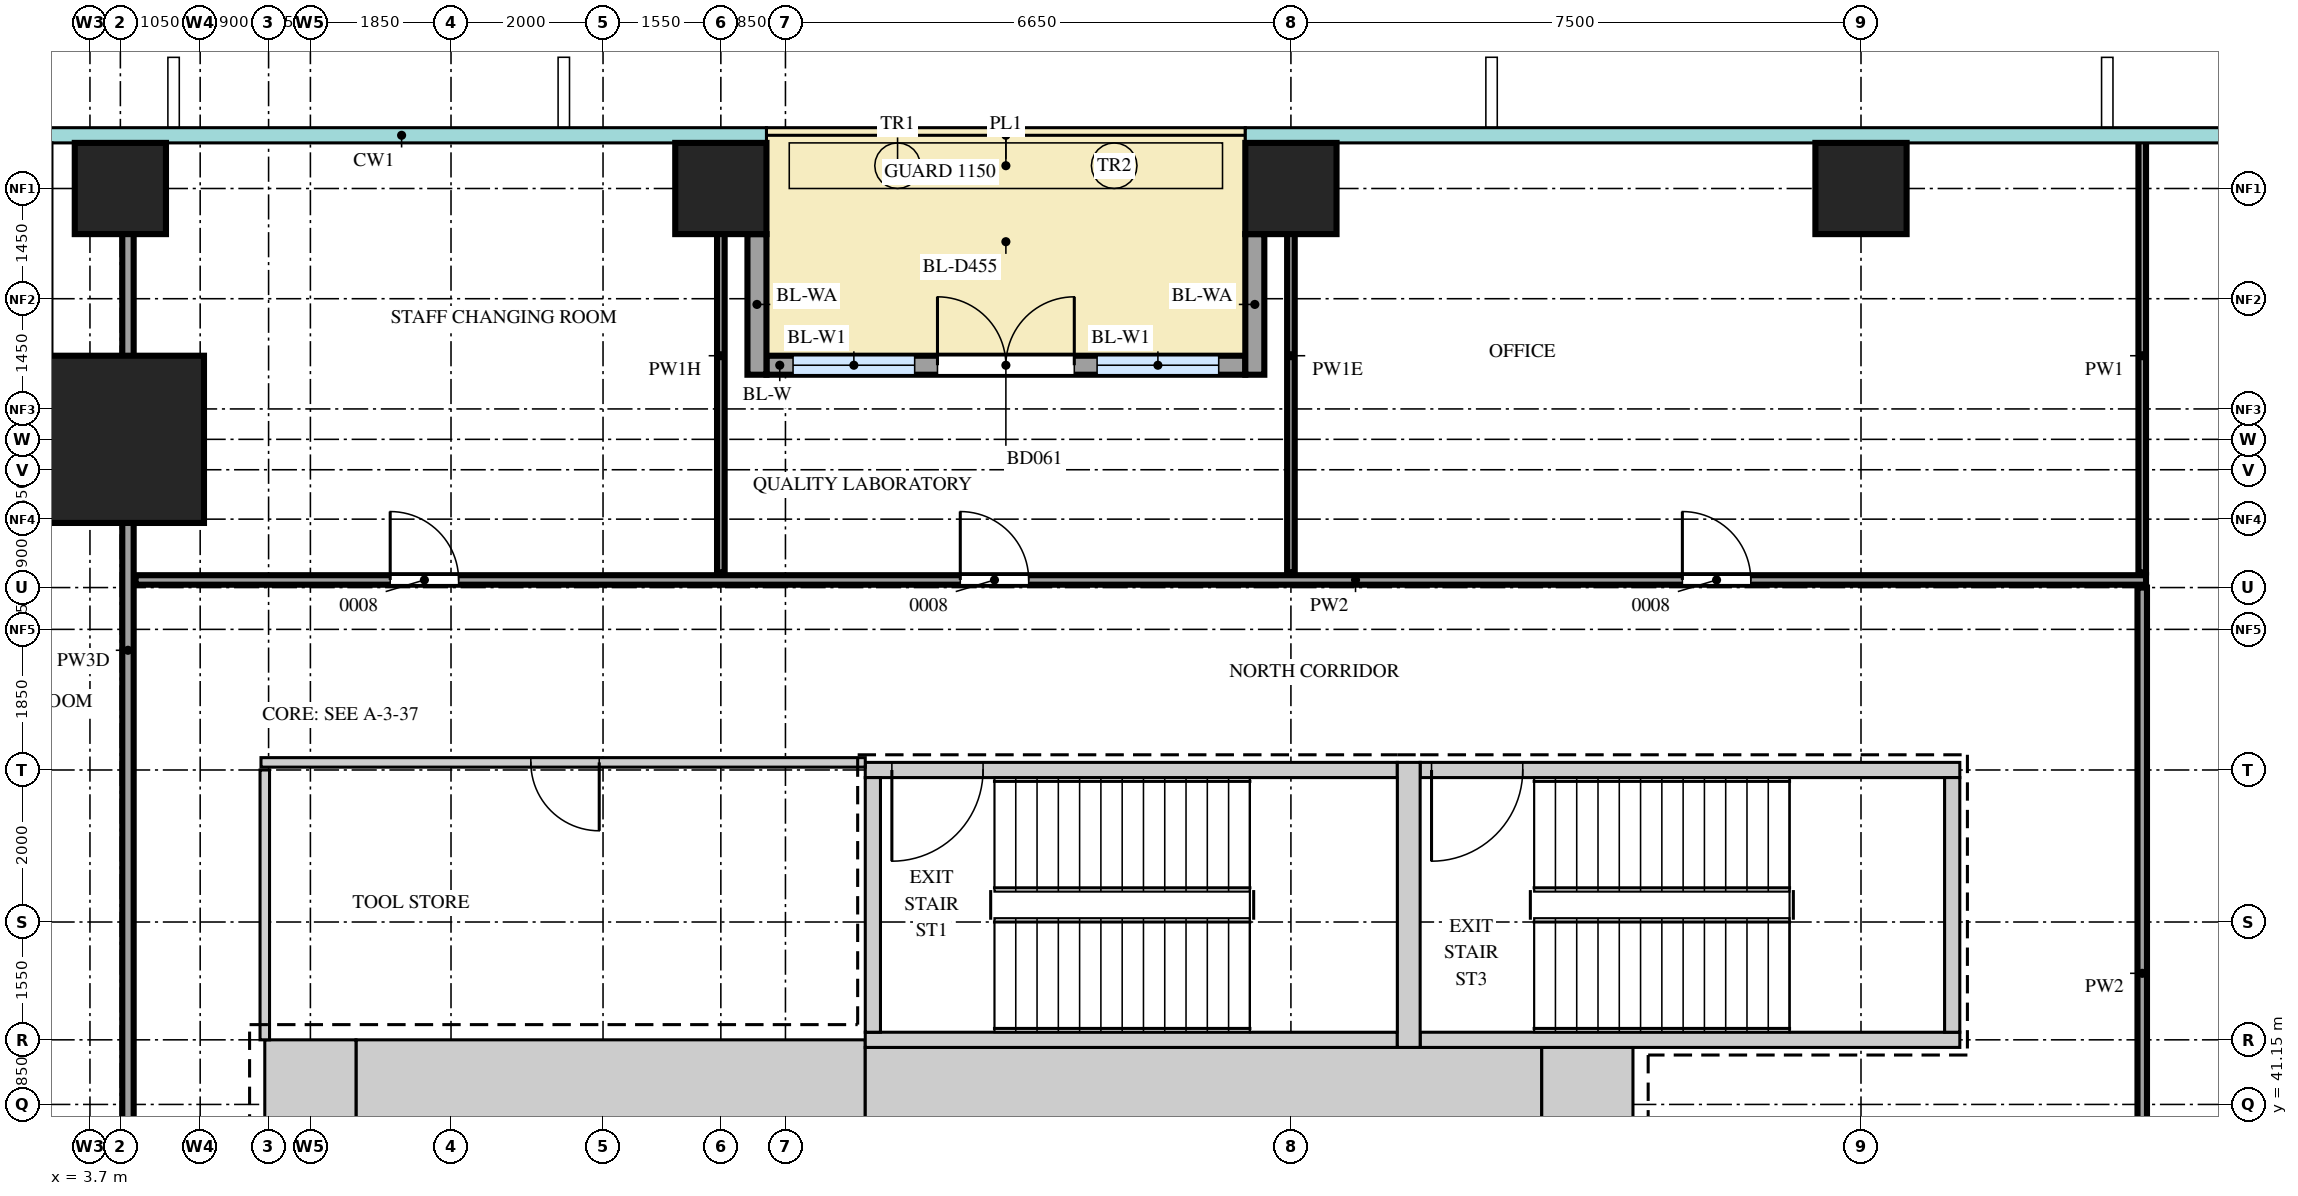
"""IFC4 building model, lengths in metres.
Left out: names, types, materials, properties, quantities, classifications, styles, units other than length and angle.
Written with IfcOpenShell. Run it as: python <this file> out.ifc"""

import sys

from ifc_helpers import new_model, si_unit, direction, frame, frame_2d, origin, origin_2d, place, context, subcontext, project, spatial, rectangle, extrude, source, transform, mapped, element, fill, save


model = new_model("IFC4")
c1 = context("Model", 3, precision=1e-05, world=origin(), true_north=direction((0.0, 1.0)))
c2 = subcontext(c1, "Body", "Model", "MODEL_VIEW")
j1 = project(units=[si_unit("LENGTHUNIT", "METRE"), si_unit("PLANEANGLEUNIT", "RADIAN")], contexts=[c1])
p1 = place(None, origin())
s1 = spatial("IfcSite", under=j1, at=p1, CompositionType="ELEMENT")
p2 = place(p1, origin())
s2 = spatial("IfcBuilding", under=s1, at=p2, CompositionType="ELEMENT")
p3 = place(p2, frame((0.0, 0.0, 33.0)))
s3 = spatial("IfcBuildingStorey", under=s2, at=p3, CompositionType="ELEMENT", Elevation=33.0)
m1 = source(origin(), c2, "Body", "SweptSolid", [
    extrude(rectangle(XDim=6.7, YDim=1.2, at=frame_2d((3.35, 0.0))), origin(), (0.0, 0.0, 1.0), 4.2),
])
p4 = place(p3, frame((7.2, 41.4, 0.0), z_axis=(0.0, 0.0, 1.0), x_axis=(1.0, 0.0, 0.0)))
e1 = element("IfcWall", 1, at=p4, inside=s3, PredefinedType="SHEAR", context=c2, shape_type="MappedRepresentation", body=[
    mapped(m1, transform((0.0, 0.0, 0.0))),
])
m2 = source(origin(), c2, "Body", "SweptSolid", [
    extrude(rectangle(XDim=8.9, YDim=1.1, at=frame_2d((4.45, 0.0))), origin(), (0.0, 0.0, 1.0), 4.2),
])
p5 = place(p3, frame((13.9, 41.35, 0.0), z_axis=(0.0, 0.0, 1.0), x_axis=(1.0, 0.0, 0.0)))
e2 = element("IfcWall", 2, at=p5, inside=s3, PredefinedType="SHEAR", context=c2, shape_type="MappedRepresentation", body=[
    mapped(m2, transform((0.0, 0.0, 0.0))),
])
m3 = source(origin(), c2, "Body", "SweptSolid", [
    extrude(rectangle(XDim=1.2, YDim=1.1, at=frame_2d((0.6, 0.0))), origin(), (0.0, 0.0, 1.0), 4.2),
])
p6 = place(p3, frame((22.8, 41.35, 0.0), z_axis=(0.0, 0.0, 1.0), x_axis=(1.0, 0.0, 0.0)))
e3 = element("IfcWall", 3, at=p6, inside=s3, PredefinedType="SHEAR", context=c2, shape_type="MappedRepresentation", body=[
    mapped(m3, transform((0.0, 0.0, 0.0))),
])
m4 = source(origin(), c2, "Body", "SweptSolid", [
    extrude(rectangle(XDim=1.2, YDim=1.2, at=frame_2d((0.6, 0.0))), origin(), (0.0, 0.0, 1.0), 4.2),
])
p7 = place(p3, frame((6.0, 41.4, 0.0), z_axis=(0.0, 0.0, 1.0), x_axis=(1.0, 0.0, 0.0)))
e4 = element("IfcWall", 4, at=p7, inside=s3, PredefinedType="SHEAR", context=c2, shape_type="MappedRepresentation", body=[
    mapped(m4, transform((0.0, 0.0, 0.0))),
])
m5 = source(origin(), c2, "Body", "SweptSolid", [
    extrude(rectangle(XDim=7.0, YDim=0.2, at=frame_2d((3.5, 0.0))), origin(), (0.0, 0.0, 1.0), 4.2),
])
p8 = place(p3, frame((13.9, 45.55, 0.0), z_axis=(0.0, 0.0, 1.0), x_axis=(1.0, 0.0, 0.0)))
e5 = element("IfcWall", 5, at=p8, inside=s3, PredefinedType="SHEAR", context=c2, shape_type="MappedRepresentation", body=[
    mapped(m5, transform((0.0, 0.0, 0.0))),
])
m6 = source(origin(), c2, "Body", "SweptSolid", [
    extrude(rectangle(XDim=1.2, YDim=2.1, at=frame_2d((0.6, 1.05))), frame((0.0, 0.11, 0.0), z_axis=(0.0, -1.0, 0.0), x_axis=(1.0, 0.0, 0.0)), (0.0, 0.0, 1.0), 0.22),
])
p9 = place(p8, frame((0.35, 0.0, 0.0)))
e6 = element("IfcOpeningElement", 6, at=p9, cuts=e5, PredefinedType="OPENING", context=c2, shape_type="MappedRepresentation", body=[
    mapped(m6, transform((0.0, 0.0, 0.0))),
])
p10 = place(p3, frame((13.9, 42.0, 0.0), z_axis=(0.0, 0.0, 1.0), x_axis=(1.0, 0.0, 0.0)))
e7 = element("IfcWall", 7, at=p10, inside=s3, PredefinedType="SHEAR", context=c2, shape_type="MappedRepresentation", body=[
    mapped(m5, transform((0.0, 0.0, 0.0))),
])
m7 = source(origin(), c2, "Body", "SweptSolid", [
    extrude(rectangle(XDim=7.1, YDim=0.2, at=frame_2d((3.55, 0.0))), origin(), (0.0, 0.0, 1.0), 4.2),
])
p11 = place(p3, frame((21.2, 45.55, 0.0), z_axis=(0.0, 0.0, 1.0), x_axis=(1.0, 0.0, 0.0)))
e8 = element("IfcWall", 8, at=p11, inside=s3, PredefinedType="SHEAR", context=c2, shape_type="MappedRepresentation", body=[
    mapped(m7, transform((0.0, 0.0, 0.0))),
])
p12 = place(p11, frame((0.15, 0.0, 0.0)))
e9 = element("IfcOpeningElement", 9, at=p12, cuts=e8, PredefinedType="OPENING", context=c2, shape_type="MappedRepresentation", body=[
    mapped(m6, transform((0.0, 0.0, 0.0))),
])
p13 = place(p3, frame((21.2, 42.0, 0.0), z_axis=(0.0, 0.0, 1.0), x_axis=(1.0, 0.0, 0.0)))
e10 = element("IfcWall", 10, at=p13, inside=s3, PredefinedType="SHEAR", context=c2, shape_type="MappedRepresentation", body=[
    mapped(m7, transform((0.0, 0.0, 0.0))),
])
m8 = source(origin(), c2, "Body", "SweptSolid", [
    extrude(rectangle(XDim=3.75, YDim=0.3, at=frame_2d((1.875, 0.0))), origin(), (0.0, 0.0, 1.0), 4.2),
])
p14 = place(p3, frame((21.05, 41.9, 0.0), z_axis=(0.0, 0.0, 1.0), x_axis=(0.0, 1.0, 0.0)))
e11 = element("IfcWall", 11, at=p14, inside=s3, PredefinedType="SHEAR", context=c2, shape_type="MappedRepresentation", body=[
    mapped(m8, transform((0.0, 0.0, 0.0))),
])
m9 = source(origin(), c2, "Body", "SweptSolid", [
    extrude(rectangle(XDim=3.35, YDim=0.2, at=frame_2d((1.675, 0.0))), origin(), (0.0, 0.0, 1.0), 4.2),
])
for number, where, z_axis, x_axis in (
    (12, (14.0, 42.1, 0.0), (0.0, 0.0, 1.0), (0.0, 1.0, 0.0)),
    (13, (28.2, 42.1, 0.0), (0.0, 0.0, 1.0), (0.0, 1.0, 0.0)),
):
    element("IfcWall", number, at=place(p3, frame(where, z_axis=z_axis, x_axis=x_axis)), inside=s3, PredefinedType="SHEAR", context=c2, shape_type="MappedRepresentation", body=[
        mapped(m9, transform((0.0, 0.0, 0.0))),
    ])
m10 = source(origin(), c2, "Body", "SweptSolid", [
    extrude(rectangle(XDim=2.2, YDim=2.2, at=origin_2d()), origin(), (0.0, 0.0, 1.0), 4.5),
])
p15 = place(p3, frame((4.1, 49.9, 0.0), z_axis=(0.0, 0.0, 1.0), x_axis=(1.0, 0.0, 0.0)))
e14 = element("IfcColumn", 14, at=p15, inside=s3, PredefinedType="COLUMN", context=c2, shape_type="MappedRepresentation", body=[
    mapped(m10, transform((0.0, 0.0, 0.0))),
])
m11 = source(origin(), c2, "Body", "SweptSolid", [
    extrude(rectangle(XDim=1.2, YDim=1.2, at=origin_2d()), origin(), (0.0, 0.0, 1.0), 4.2),
])
for number, where, z_axis, x_axis in (
    (15, (4.1, 53.2, 0.0), (0.0, 0.0, 1.0), (1.0, 0.0, 0.0)),
    (16, (12.0, 53.2, 0.0), (0.0, 0.0, 1.0), (1.0, 0.0, 0.0)),
    (17, (19.5, 53.2, 0.0), (0.0, 0.0, 1.0), (1.0, 0.0, 0.0)),
    (18, (27.0, 53.2, 0.0), (0.0, 0.0, 1.0), (1.0, 0.0, 0.0)),
):
    element("IfcColumn", number, at=place(p3, frame(where, z_axis=z_axis, x_axis=x_axis)), inside=s3, PredefinedType="COLUMN", context=c2, shape_type="MappedRepresentation", body=[
        mapped(m11, transform((0.0, 0.0, 0.0))),
    ])
m12 = source(origin(), c2, "Body", "SweptSolid", [
    extrude(rectangle(XDim=6.3, YDim=0.25, at=frame_2d((3.15, 0.0))), origin(), (0.0, 0.0, 1.0), 4.0),
])
p16 = place(p3, frame((12.6, 50.875, 0.0), z_axis=(0.0, 0.0, 1.0), x_axis=(1.0, 0.0, 0.0)))
e19 = element("IfcWall", 19, at=p16, inside=s3, PredefinedType="SOLIDWALL", context=c2, shape_type="MappedRepresentation", body=[
    mapped(m12, transform((0.0, 0.0, 0.0))),
])
m13 = source(origin(), c2, "Body", "SweptSolid", [
    extrude(rectangle(XDim=1.6, YDim=2.4, at=frame_2d((0.8, 1.2))), frame((0.0, 0.135, 0.0), z_axis=(0.0, -1.0, 0.0), x_axis=(1.0, 0.0, 0.0)), (0.0, 0.0, 1.0), 0.27),
])
p17 = place(p16, frame((0.35, 0.0, 0.0)))
e20 = element("IfcOpeningElement", 20, at=p17, cuts=e19, PredefinedType="OPENING", context=c2, shape_type="MappedRepresentation", body=[
    mapped(m13, transform((0.0, 0.0, 0.0))),
])
p18 = place(p16, frame((4.35, 0.0, 0.0)))
e21 = element("IfcOpeningElement", 21, at=p18, cuts=e19, PredefinedType="OPENING", context=c2, shape_type="MappedRepresentation", body=[
    mapped(m13, transform((0.0, 0.0, 0.0))),
])
m14 = source(origin(), c2, "Body", "SweptSolid", [
    extrude(rectangle(XDim=1.8, YDim=2.4, at=frame_2d((0.9, 1.2))), frame((0.0, 0.135, 0.0), z_axis=(0.0, -1.0, 0.0), x_axis=(1.0, 0.0, 0.0)), (0.0, 0.0, 1.0), 0.27),
])
p19 = place(p16, frame((2.25, 0.0, 0.0)))
e22 = element("IfcOpeningElement", 22, at=p19, cuts=e19, PredefinedType="OPENING", context=c2, shape_type="MappedRepresentation", body=[
    mapped(m14, transform((0.0, 0.0, 0.0))),
])
m15 = source(origin(), c2, "Body", "SweptSolid", [
    extrude(rectangle(XDim=1.85, YDim=0.25, at=frame_2d((0.925, 0.0))), origin(), (0.0, 0.0, 1.0), 3.9),
])
for number, where, z_axis, x_axis in (
    (23, (12.475, 52.6, 0.0), (0.0, 0.0, 1.0), (0.0, -1.0, 0.0)),
    (24, (19.025, 52.6, 0.0), (0.0, 0.0, 1.0), (0.0, -1.0, 0.0)),
):
    element("IfcWall", number, at=place(p3, frame(where, z_axis=z_axis, x_axis=x_axis)), inside=s3, PredefinedType="SOLIDWALL", context=c2, shape_type="MappedRepresentation", body=[
        mapped(m15, transform((0.0, 0.0, 0.0))),
    ])
m16 = source(origin(), c2, "Body", "SweptSolid", [
    extrude(rectangle(XDim=19.75, YDim=0.15, at=frame_2d((9.875, 0.0))), origin(), (0.0, 0.0, 1.0), 3.6),
])
p20 = place(p3, frame((4.2, 34.1, 0.0), z_axis=(0.0, 0.0, 1.0), x_axis=(0.0, 1.0, 0.0)))
e25 = element("IfcWall", 25, at=p20, inside=s3, PredefinedType="PARTITIONING", context=c2, shape_type="MappedRepresentation", body=[
    mapped(m16, transform((0.0, 0.0, 0.0))),
])
m17 = source(origin(), c2, "Body", "SweptSolid", [
    extrude(rectangle(XDim=0.9, YDim=2.1, at=frame_2d((0.45, 1.05))), frame((0.0, 0.085, 0.0), z_axis=(0.0, -1.0, 0.0), x_axis=(1.0, 0.0, 0.0)), (0.0, 0.0, 1.0), 0.17),
])
p21 = place(p20, frame((5.4, 0.0, 0.0)))
e26 = element("IfcOpeningElement", 26, at=p21, cuts=e25, PredefinedType="OPENING", context=c2, shape_type="MappedRepresentation", body=[
    mapped(m17, transform((0.0, 0.0, 0.0))),
])
m18 = source(origin(), c2, "Body", "SweptSolid", [
    extrude(rectangle(XDim=10.15, YDim=0.125, at=frame_2d((5.075, 0.0))), origin(), (0.0, 0.0, 1.0), 4.3),
])
p22 = place(p3, frame((30.7, 37.8, 0.0), z_axis=(0.0, 0.0, 1.0), x_axis=(0.0, 1.0, 0.0)))
e27 = element("IfcWall", 27, at=p22, inside=s3, PredefinedType="PARTITIONING", context=c2, shape_type="MappedRepresentation", body=[
    mapped(m18, transform((0.0, 0.0, 0.0))),
])
m19 = source(origin(), c2, "Body", "SweptSolid", [
    extrude(rectangle(XDim=3.55, YDim=0.125, at=frame_2d((1.775, 0.0))), origin(), (0.0, 0.0, 1.0), 4.3),
])
p23 = place(p3, frame((6.0, 42.0, 0.0), z_axis=(0.0, 0.0, 1.0), x_axis=(0.0, 1.0, 0.0)))
e28 = element("IfcWall", 28, at=p23, inside=s3, PredefinedType="PARTITIONING", context=c2, shape_type="MappedRepresentation", body=[
    mapped(m19, transform((0.0, 0.0, 0.0))),
])
m20 = source(origin(), c2, "Body", "SweptSolid", [
    extrude(rectangle(XDim=7.95, YDim=0.125, at=frame_2d((3.975, 0.0))), origin(), (0.0, 0.0, 1.0), 4.3),
])
p24 = place(p3, frame((5.95, 45.65, 0.0), z_axis=(0.0, 0.0, 1.0), x_axis=(1.0, 0.0, 0.0)))
e29 = element("IfcWall", 29, at=p24, inside=s3, PredefinedType="PARTITIONING", context=c2, shape_type="MappedRepresentation", body=[
    mapped(m20, transform((0.0, 0.0, 0.0))),
])
m21 = source(origin(), c2, "Body", "SweptSolid", [
    extrude(rectangle(XDim=0.9, YDim=2.1, at=frame_2d((0.45, 1.05))), frame((0.0, 0.073, 0.0), z_axis=(0.0, -1.0, 0.0), x_axis=(1.0, 0.0, 0.0)), (0.0, 0.0, 1.0), 0.145),
])
p25 = place(p24, frame((3.55, 0.0, 0.0)))
e30 = element("IfcOpeningElement", 30, at=p25, cuts=e29, PredefinedType="OPENING", context=c2, shape_type="MappedRepresentation", body=[
    mapped(m21, transform((0.0, 0.0, 0.0))),
])
m22 = source(origin(), c2, "Body", "SweptSolid", [
    extrude(rectangle(XDim=26.45, YDim=0.125, at=frame_2d((13.225, 0.0))), origin(), (0.0, 0.0, 1.0), 4.3),
])
p26 = place(p3, frame((4.3, 48.05, 0.0), z_axis=(0.0, 0.0, 1.0), x_axis=(1.0, 0.0, 0.0)))
e31 = element("IfcWall", 31, at=p26, inside=s3, PredefinedType="PARTITIONING", context=c2, shape_type="MappedRepresentation", body=[
    mapped(m22, transform((0.0, 0.0, 0.0))),
])
p27 = place(p26, frame((3.35, 0.0, 0.0)))
e32 = element("IfcOpeningElement", 32, at=p27, cuts=e31, PredefinedType="OPENING", context=c2, shape_type="MappedRepresentation", body=[
    mapped(m21, transform((0.0, 0.0, 0.0))),
])
p28 = place(p26, frame((10.85, 0.0, 0.0)))
e33 = element("IfcOpeningElement", 33, at=p28, cuts=e31, PredefinedType="OPENING", context=c2, shape_type="MappedRepresentation", body=[
    mapped(m21, transform((0.0, 0.0, 0.0))),
])
p29 = place(p26, frame((20.35, 0.0, 0.0)))
e34 = element("IfcOpeningElement", 34, at=p29, cuts=e31, PredefinedType="OPENING", context=c2, shape_type="MappedRepresentation", body=[
    mapped(m21, transform((0.0, 0.0, 0.0))),
])
m23 = source(origin(), c2, "Body", "SweptSolid", [
    extrude(rectangle(XDim=5.7, YDim=0.1, at=frame_2d((2.85, 0.0))), origin(), (0.0, 0.0, 1.0), 3.7),
])
p30 = place(p3, frame((12.0, 48.15, 0.0), z_axis=(0.0, 0.0, 1.0), x_axis=(0.0, 1.0, 0.0)))
e35 = element("IfcWall", 35, at=p30, inside=s3, PredefinedType="PARTITIONING", context=c2, shape_type="MappedRepresentation", body=[
    mapped(m23, transform((0.0, 0.0, 0.0))),
])
m24 = source(origin(), c2, "Body", "SweptSolid", [
    extrude(rectangle(XDim=5.7, YDim=0.1, at=frame_2d((2.85, 0.0))), origin(), (0.0, 0.0, 1.0), 3.84),
])
p31 = place(p3, frame((19.5, 48.15, 0.0), z_axis=(0.0, 0.0, 1.0), x_axis=(0.0, 1.0, 0.0)))
e36 = element("IfcWall", 36, at=p31, inside=s3, PredefinedType="PARTITIONING", context=c2, shape_type="MappedRepresentation", body=[
    mapped(m24, transform((0.0, 0.0, 0.0))),
])
m25 = source(origin(), c2, "Body", "SweptSolid", [
    extrude(rectangle(XDim=5.7, YDim=0.1, at=frame_2d((2.85, 0.0))), origin(), (0.0, 0.0, 1.0), 4.3),
])
p32 = place(p3, frame((30.7, 48.15, 0.0), z_axis=(0.0, 0.0, 1.0), x_axis=(0.0, 1.0, 0.0)))
e37 = element("IfcWall", 37, at=p32, inside=s3, PredefinedType="PARTITIONING", context=c2, shape_type="MappedRepresentation", body=[
    mapped(m25, transform((0.0, 0.0, 0.0))),
])
m26 = source(origin(), c2, "Body", "SweptSolid", [
    extrude(rectangle(XDim=1.6, YDim=2.4, at=frame_2d((0.8, 1.2))), frame((0.0, 0.03, 0.0), z_axis=(0.0, -1.0, 0.0), x_axis=(1.0, 0.0, 0.0)), (0.0, 0.0, 1.0), 0.06),
])
p33 = place(p17, origin())
e38 = element("IfcWindow", 38, at=p33, inside=s3, PartitioningType="SINGLE_PANEL", PredefinedType="WINDOW", context=c2, shape_type="MappedRepresentation", body=[
    mapped(m26, transform((0.0, 0.0, 0.0))),
])
fill(e20, e38)
p34 = place(p18, origin())
e39 = element("IfcWindow", 39, at=p34, inside=s3, PartitioningType="SINGLE_PANEL", PredefinedType="WINDOW", context=c2, shape_type="MappedRepresentation", body=[
    mapped(m26, transform((0.0, 0.0, 0.0))),
])
fill(e21, e39)
m27 = source(origin(), c2, "Body", "SweptSolid", [
    extrude(rectangle(XDim=1.8, YDim=2.4, at=frame_2d((0.9, 1.2))), frame((0.0, 0.025, 0.0), z_axis=(0.0, -1.0, 0.0), x_axis=(1.0, 0.0, 0.0)), (0.0, 0.0, 1.0), 0.05),
])
p35 = place(p19, origin())
e40 = element("IfcDoor", 40, at=p35, inside=s3, OperationType="DOUBLE_DOOR_DOUBLE_SWING", PredefinedType="DOOR", context=c2, shape_type="MappedRepresentation", body=[
    mapped(m27, transform((0.0, 0.0, 0.0))),
])
fill(e22, e40)
m28 = source(origin(), c2, "Body", "SweptSolid", [
    extrude(rectangle(XDim=0.9, YDim=2.1, at=frame_2d((0.45, 1.05))), frame((0.0, 0.025, 0.0), z_axis=(0.0, -1.0, 0.0), x_axis=(1.0, 0.0, 0.0)), (0.0, 0.0, 1.0), 0.05),
])
p36 = place(p27, origin())
e41 = element("IfcDoor", 41, at=p36, inside=s3, OperationType="SINGLE_SWING_RIGHT", PredefinedType="DOOR", context=c2, shape_type="MappedRepresentation", body=[
    mapped(m28, transform((0.0, 0.0, 0.0))),
])
fill(e32, e41)
p37 = place(p28, origin())
e42 = element("IfcDoor", 42, at=p37, inside=s3, OperationType="SINGLE_SWING_RIGHT", PredefinedType="DOOR", context=c2, shape_type="MappedRepresentation", body=[
    mapped(m28, transform((0.0, 0.0, 0.0))),
])
fill(e33, e42)
p38 = place(p29, origin())
e43 = element("IfcDoor", 43, at=p38, inside=s3, OperationType="SINGLE_SWING_RIGHT", PredefinedType="DOOR", context=c2, shape_type="MappedRepresentation", body=[
    mapped(m28, transform((0.0, 0.0, 0.0))),
])
fill(e34, e43)
p39 = place(p25, origin())
e44 = element("IfcDoor", 44, at=p39, inside=s3, OperationType="SINGLE_SWING_RIGHT", PredefinedType="DOOR", context=c2, shape_type="MappedRepresentation", body=[
    mapped(m28, transform((0.0, 0.0, 0.0))),
])
fill(e30, e44)
m29 = source(origin(), c2, "Body", "SweptSolid", [
    extrude(rectangle(XDim=1.2, YDim=2.1, at=frame_2d((0.6, 1.05))), frame((0.0, 0.025, 0.0), z_axis=(0.0, -1.0, 0.0), x_axis=(1.0, 0.0, 0.0)), (0.0, 0.0, 1.0), 0.05),
])
p40 = place(p9, origin())
e45 = element("IfcDoor", 45, at=p40, inside=s3, OperationType="SINGLE_SWING_LEFT", PredefinedType="DOOR", context=c2, shape_type="MappedRepresentation", body=[
    mapped(m29, transform((0.0, 0.0, 0.0))),
])
fill(e6, e45)
p41 = place(p12, origin())
e46 = element("IfcDoor", 46, at=p41, inside=s3, OperationType="SINGLE_SWING_LEFT", PredefinedType="DOOR", context=c2, shape_type="MappedRepresentation", body=[
    mapped(m29, transform((0.0, 0.0, 0.0))),
])
fill(e9, e46)
save(model, sys.argv[1])
